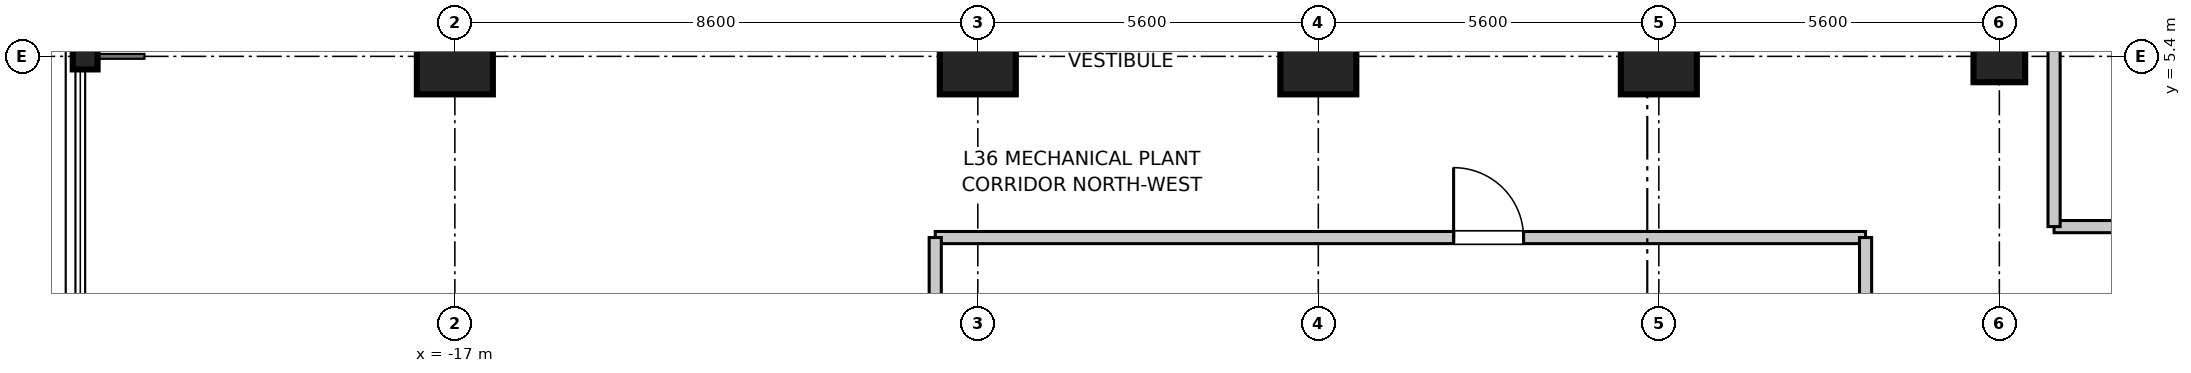
"""IFC4 building model, lengths in metres.
Left out: names, types, materials, properties, quantities, classifications, styles, units other than length and angle.
Written with IfcOpenShell. Run it as: python <this file> out.ifc"""

import sys

from ifc_helpers import new_model, si_unit, direction, frame, frame_2d, origin, origin_2d, place, context, subcontext, project, spatial, rectangle, i_section, extrude, source, transform, mapped, element, fill, save


model = new_model("IFC4")
c1 = context("Model", 3, precision=1e-05, world=origin(), true_north=direction((0.0, 1.0)))
c2 = subcontext(c1, "Body", "Model", "MODEL_VIEW")
j1 = project(units=[si_unit("LENGTHUNIT", "METRE"), si_unit("PLANEANGLEUNIT", "RADIAN")], contexts=[c1])
p1 = place(None, origin())
s1 = spatial("IfcSite", under=j1, at=p1, CompositionType="ELEMENT")
p2 = place(p1, origin())
s2 = spatial("IfcBuilding", under=s1, at=p2, CompositionType="ELEMENT")
p3 = place(p2, frame((0.0, 0.0, 144.2)))
s3 = spatial("IfcBuildingStorey", under=s2, at=p3, CompositionType="ELEMENT", Elevation=144.2)
m1 = source(origin(), c2, "Body", "SweptSolid", [
    extrude(rectangle(XDim=1.25, YDim=1.25, at=origin_2d()), origin(), (0.0, 0.0, 1.0), 4.755),
])
for number, where, z_axis, x_axis in (
    (1, (-17.0, 5.4, 0.0), (0.0, 0.0, 1.0), (1.0, 0.0, 0.0)),
    (2, (-8.4, 5.4, 0.0), (0.0, 0.0, 1.0), (1.0, 0.0, 0.0)),
    (3, (-2.8, 5.4, 0.0), (0.0, 0.0, 1.0), (1.0, 0.0, 0.0)),
    (4, (2.8, 5.4, 0.0), (0.0, 0.0, 1.0), (1.0, 0.0, 0.0)),
):
    element("IfcColumn", number, at=place(p3, frame(where, z_axis=z_axis, x_axis=x_axis)), inside=s3, PredefinedType="COLUMN", context=c2, shape_type="MappedRepresentation", body=[
        mapped(m1, transform((0.0, 0.0, 0.0), scale=1.0)),
    ])
m2 = source(origin(), c2, "Body", "SweptSolid", [
    extrude(rectangle(XDim=0.85, YDim=0.85, at=origin_2d()), origin(), (0.0, 0.0, 1.0), 4.755),
])
p4 = place(p3, frame((8.4, 5.4, 0.0), z_axis=(0.0, 0.0, 1.0), x_axis=(1.0, 0.0, 0.0)))
e5 = element("IfcColumn", 5, at=p4, inside=s3, PredefinedType="PILASTER", context=c2, shape_type="MappedRepresentation", body=[
    mapped(m2, transform((0.0, 0.0, 0.0), scale=1.0)),
])
m3 = source(origin(), c2, "Body", "SweptSolid", [
    extrude(i_section(OverallWidth=0.409, OverallDepth=0.43, WebThickness=0.021, FlangeThickness=0.034, at=origin_2d()), origin(), (0.0, 0.0, 1.0), 4.694),
])
p5 = place(p3, frame((-23.08, 5.4, 0.0), z_axis=(0.127855804376, 0.0, 0.991792767309), x_axis=(0.0, 1.0, 0.0)))
e6 = element("IfcColumn", 6, at=p5, inside=s3, PredefinedType="COLUMN", context=c2, shape_type="MappedRepresentation", body=[
    mapped(m3, transform((0.0, 0.0, 0.0), scale=1.0)),
])
m4 = source(origin(), c2, "Body", "SweptSolid", [
    extrude(rectangle(XDim=2.12, YDim=0.2, at=frame_2d((1.06, 0.0))), origin(), (0.0, 0.0, 1.0), 3.4),
])
p6 = place(p3, frame((9.3, 2.6, 0.0), z_axis=(0.0, 0.0, 1.0), x_axis=(1.0, 0.0, 0.0)))
e7 = element("IfcWall", 7, at=p6, inside=s3, PredefinedType="PARTITIONING", context=c2, shape_type="MappedRepresentation", body=[
    mapped(m4, transform((0.0, 0.0, 0.0), scale=1.0)),
])
m5 = source(origin(), c2, "Body", "SweptSolid", [
    extrude(rectangle(XDim=3.05, YDim=0.2, at=frame_2d((1.525, 0.0))), origin(), (0.0, 0.0, 1.0), 3.4),
])
p7 = place(p3, frame((9.3, 2.6, 0.0), z_axis=(0.0, 0.0, 1.0), x_axis=(0.0, 1.0, 0.0)))
e8 = element("IfcWall", 8, at=p7, inside=s3, PredefinedType="PARTITIONING", context=c2, shape_type="MappedRepresentation", body=[
    mapped(m5, transform((0.0, 0.0, 0.0), scale=1.0)),
])
m6 = source(origin(), c2, "Body", "SweptSolid", [
    extrude(rectangle(XDim=15.3, YDim=0.2, at=frame_2d((7.65, 0.0))), origin(), (0.0, 0.0, 1.0), 3.4),
])
p8 = place(p3, frame((-9.1, 2.42, 0.0), z_axis=(0.0, 0.0, 1.0), x_axis=(1.0, 0.0, 0.0)))
e9 = element("IfcWall", 9, at=p8, inside=s3, PredefinedType="PARTITIONING", context=c2, shape_type="MappedRepresentation", body=[
    mapped(m6, transform((0.0, 0.0, 0.0), scale=1.0)),
])
p9 = place(p8, frame((8.525, 0.0, 0.0)))
e10 = element("IfcOpeningElement", 10, at=p9, cuts=e9, PredefinedType="OPENING", context=c2, shape_type="SweptSolid", body=[
    extrude(rectangle(XDim=1.15, YDim=2.15, at=frame_2d((0.575, 1.075))), frame((0.0, 0.11, 0.0), z_axis=(0.0, -1.0, 0.0), x_axis=(1.0, 0.0, 0.0)), (0.0, 0.0, 1.0), 0.22),
])
m7 = source(origin(), c2, "Body", "SweptSolid", [
    extrude(rectangle(XDim=4.84, YDim=0.2, at=frame_2d((2.42, 0.0))), origin(), (0.0, 0.0, 1.0), 3.4),
])
for number, where, z_axis, x_axis in (
    (11, (-9.1, -2.42, 0.0), (0.0, 0.0, 1.0), (0.0, 1.0, 0.0)),
    (12, (6.2, -2.42, 0.0), (0.0, 0.0, 1.0), (0.0, 1.0, 0.0)),
):
    element("IfcWall", number, at=place(p3, frame(where, z_axis=z_axis, x_axis=x_axis)), inside=s3, PredefinedType="PARTITIONING", context=c2, shape_type="MappedRepresentation", body=[
        mapped(m7, transform((0.0, 0.0, 0.0), scale=1.0)),
    ])
m8 = source(origin(), c2, "Body", "SweptSolid", [
    extrude(rectangle(XDim=1.15, YDim=2.15, at=frame_2d((0.575, 1.075))), frame((0.0, 0.025, 0.0), z_axis=(0.0, -1.0, 0.0), x_axis=(1.0, 0.0, 0.0)), (0.0, 0.0, 1.0), 0.05),
])
p10 = place(p9, frame((1.15, 0.0, 0.0), z_axis=(0.0, 0.0, 1.0), x_axis=(-1.0, 0.0, 0.0)))
e13 = element("IfcDoor", 13, at=p10, inside=s3, OperationType="SINGLE_SWING_LEFT", PredefinedType="DOOR", context=c2, shape_type="MappedRepresentation", body=[
    mapped(m8, transform((0.0, 0.0, 0.0), scale=1.0)),
])
fill(e10, e13)
save(model, sys.argv[1])
